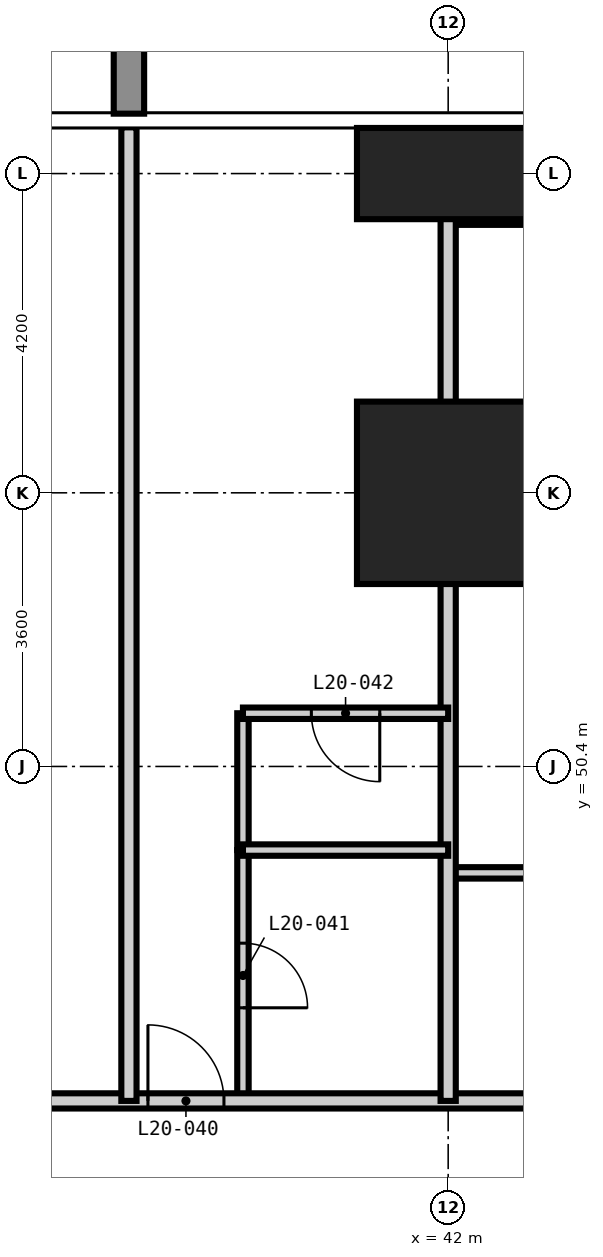
"""IFC4 building model, lengths in metres.
Left out: names, types, materials, properties, quantities, classifications, styles, units other than length and angle.
Written with IfcOpenShell. Run it as: python <this file> out.ifc"""

import sys

from ifc_helpers import new_model, si_unit, direction, frame, frame_2d, origin, origin_2d, place, context, subcontext, project, spatial, rectangle, extrude, element, fill, save


model = new_model("IFC4")
c1 = context("Model", 3, precision=1e-05, world=origin(), true_north=direction((0.0, 1.0)))
c2 = subcontext(c1, "Body", "Model", "MODEL_VIEW")
j1 = project(units=[si_unit("LENGTHUNIT", "METRE"), si_unit("PLANEANGLEUNIT", "RADIAN")], contexts=[c1])
p1 = place(None, origin())
s1 = spatial("IfcSite", under=j1, at=p1, CompositionType="ELEMENT")
p2 = place(p1, origin())
s2 = spatial("IfcBuilding", under=s1, at=p2, CompositionType="ELEMENT")
p3 = place(p2, frame((0.0, 0.0, 81.0)))
s3 = spatial("IfcBuildingStorey", under=s2, at=p3, CompositionType="ELEMENT", Elevation=81.0)
p4 = place(p3, frame((42.0, 54.0, -0.35), z_axis=(0.0, 0.0, 1.0), x_axis=(1.0, 0.0, 0.0)))
e1 = element("IfcColumn", 1, at=p4, inside=s3, PredefinedType="COLUMN", context=c2, shape_type="SweptSolid", body=[
    extrude(rectangle(XDim=2.4, YDim=2.4, at=origin_2d()), origin(), (0.0, 0.0, 1.0), 3.6),
])
p5 = place(p3, frame((42.0, 58.2, -0.35), z_axis=(0.0, 0.0, 1.0), x_axis=(1.0, 0.0, 0.0)))
e2 = element("IfcColumn", 2, at=p5, inside=s3, PredefinedType="COLUMN", context=c2, shape_type="SweptSolid", body=[
    extrude(rectangle(XDim=2.4, YDim=1.2, at=origin_2d()), origin(), (0.0, 0.0, 1.0), 3.6),
])
p6 = place(p3, frame((39.3, 46.0, 0.0), z_axis=(0.0, 0.0, 1.0), x_axis=(0.0, 1.0, 0.0)))
e3 = element("IfcWall", 3, at=p6, inside=s3, PredefinedType="PARTITIONING", context=c2, shape_type="SweptSolid", body=[
    extrude(rectangle(XDim=3.3, YDim=0.15, at=frame_2d((1.65, 0.0))), origin(), (0.0, 0.0, 1.0), 3.25),
])
p7 = place(p6, frame((1.225, 0.0, 0.0)))
e4 = element("IfcOpeningElement", 4, at=p7, cuts=e3, PredefinedType="OPENING", context=c2, shape_type="SweptSolid", body=[
    extrude(rectangle(XDim=0.85, YDim=2.1, at=frame_2d((0.425, 1.05))), frame((0.0, 0.085, 0.0), z_axis=(0.0, -1.0, 0.0), x_axis=(1.0, 0.0, 0.0)), (0.0, 0.0, 1.0), 0.17),
])
p8 = place(p3, frame((42.0, 49.0, 0.0), z_axis=(0.0, 0.0, 1.0), x_axis=(1.0, 0.0, 0.0)))
e5 = element("IfcWall", 5, at=p8, inside=s3, PredefinedType="PARTITIONING", context=c2, shape_type="SweptSolid", body=[
    extrude(rectangle(XDim=3.4, YDim=0.15, at=frame_2d((1.7, 0.0))), origin(), (0.0, 0.0, 1.0), 3.25),
])
p9 = place(p8, frame((1.275, 0.0, 0.0)))
e6 = element("IfcOpeningElement", 6, at=p9, cuts=e5, PredefinedType="OPENING", context=c2, shape_type="SweptSolid", body=[
    extrude(rectangle(XDim=0.85, YDim=2.1, at=frame_2d((0.425, 1.05))), frame((0.0, 0.085, 0.0), z_axis=(0.0, -1.0, 0.0), x_axis=(1.0, 0.0, 0.0)), (0.0, 0.0, 1.0), 0.17),
])
p10 = place(p3, frame((42.0, 57.6, 0.0), z_axis=(0.0, 0.0, 1.0), x_axis=(1.0, 0.0, 0.0)))
e7 = element("IfcWall", 7, at=p10, inside=s3, PredefinedType="PARTITIONING", context=c2, shape_type="SweptSolid", body=[
    extrude(rectangle(XDim=3.6, YDim=0.15, at=frame_2d((1.8, 0.0))), origin(), (0.0, 0.0, 1.0), 3.25),
])
p11 = place(p10, frame((1.375, 0.0, 0.0)))
e8 = element("IfcOpeningElement", 8, at=p11, cuts=e7, PredefinedType="OPENING", context=c2, shape_type="SweptSolid", body=[
    extrude(rectangle(XDim=0.85, YDim=2.1, at=frame_2d((0.425, 1.05))), frame((0.0, 0.085, 0.0), z_axis=(0.0, -1.0, 0.0), x_axis=(1.0, 0.0, 0.0)), (0.0, 0.0, 1.0), 0.17),
])
p12 = place(p3, frame((14.0, 46.0, 0.0), z_axis=(0.0, 0.0, 1.0), x_axis=(1.0, 0.0, 0.0)))
e9 = element("IfcWall", 9, at=p12, inside=s3, PredefinedType="PARTITIONING", context=c2, shape_type="SweptSolid", body=[
    extrude(rectangle(XDim=31.4, YDim=0.2, at=frame_2d((15.7, 0.0))), origin(), (0.0, 0.0, 1.0), 3.25),
])
p13 = place(p12, frame((5.75, 0.0, 0.0)))
e10 = element("IfcOpeningElement", 10, at=p13, cuts=e9, PredefinedType="OPENING", context=c2, shape_type="SweptSolid", body=[
    extrude(rectangle(XDim=1.0, YDim=2.2, at=frame_2d((0.5, 1.1))), frame((0.0, 0.11, 0.0), z_axis=(0.0, -1.0, 0.0), x_axis=(1.0, 0.0, 0.0)), (0.0, 0.0, 1.0), 0.22),
])
p14 = place(p12, frame((10.7, 0.0, 0.0)))
e11 = element("IfcOpeningElement", 11, at=p14, cuts=e9, PredefinedType="OPENING", context=c2, shape_type="SweptSolid", body=[
    extrude(rectangle(XDim=1.0, YDim=2.2, at=frame_2d((0.5, 1.1))), frame((0.0, 0.11, 0.0), z_axis=(0.0, -1.0, 0.0), x_axis=(1.0, 0.0, 0.0)), (0.0, 0.0, 1.0), 0.22),
])
p15 = place(p12, frame((19.1, 0.0, 0.0)))
e12 = element("IfcOpeningElement", 12, at=p15, cuts=e9, PredefinedType="OPENING", context=c2, shape_type="SweptSolid", body=[
    extrude(rectangle(XDim=1.0, YDim=2.2, at=frame_2d((0.5, 1.1))), frame((0.0, 0.11, 0.0), z_axis=(0.0, -1.0, 0.0), x_axis=(1.0, 0.0, 0.0)), (0.0, 0.0, 1.0), 0.22),
])
p16 = place(p12, frame((24.05, 0.0, 0.0)))
e13 = element("IfcOpeningElement", 13, at=p16, cuts=e9, PredefinedType="OPENING", context=c2, shape_type="SweptSolid", body=[
    extrude(rectangle(XDim=1.0, YDim=2.2, at=frame_2d((0.5, 1.1))), frame((0.0, 0.11, 0.0), z_axis=(0.0, -1.0, 0.0), x_axis=(1.0, 0.0, 0.0)), (0.0, 0.0, 1.0), 0.22),
])
for number, where, z_axis, x_axis in (
    (14, (37.8, 46.0, 0.0), (0.0, 0.0, 1.0), (0.0, 1.0, 0.0)),
    (15, (42.0, 46.0, 0.0), (0.0, 0.0, 1.0), (0.0, 1.0, 0.0)),
):
    element("IfcWall", number, at=place(p3, frame(where, z_axis=z_axis, x_axis=x_axis)), inside=s3, PredefinedType="PARTITIONING", context=c2, shape_type="SweptSolid", body=[
        extrude(rectangle(XDim=12.808, YDim=0.2, at=frame_2d((6.404, 0.0))), origin(), (0.0, 0.0, 1.0), 3.25),
    ])
p17 = place(p3, frame((39.3, 49.3, 0.0), z_axis=(0.0, 0.0, 1.0), x_axis=(0.0, 1.0, 0.0)))
e16 = element("IfcWall", 16, at=p17, inside=s3, PredefinedType="PARTITIONING", context=c2, shape_type="SweptSolid", body=[
    extrude(rectangle(XDim=1.8, YDim=0.15, at=frame_2d((0.9, 0.0))), origin(), (0.0, 0.0, 1.0), 3.25),
])
p18 = place(p3, frame((39.3, 49.3, 0.0), z_axis=(0.0, 0.0, 1.0), x_axis=(1.0, 0.0, 0.0)))
e17 = element("IfcWall", 17, at=p18, inside=s3, PredefinedType="PARTITIONING", context=c2, shape_type="SweptSolid", body=[
    extrude(rectangle(XDim=2.7, YDim=0.15, at=frame_2d((1.35, 0.0))), origin(), (0.0, 0.0, 1.0), 3.25),
])
p19 = place(p3, frame((39.3, 51.1, 0.0), z_axis=(0.0, 0.0, 1.0), x_axis=(1.0, 0.0, 0.0)))
e18 = element("IfcWall", 18, at=p19, inside=s3, PredefinedType="PARTITIONING", context=c2, shape_type="SweptSolid", body=[
    extrude(rectangle(XDim=2.7, YDim=0.15, at=frame_2d((1.35, 0.0))), origin(), (0.0, 0.0, 1.0), 3.25),
])
p20 = place(p19, frame((0.9, 0.0, 0.0)))
e19 = element("IfcOpeningElement", 19, at=p20, cuts=e18, PredefinedType="OPENING", context=c2, shape_type="SweptSolid", body=[
    extrude(rectangle(XDim=0.9, YDim=2.1, at=frame_2d((0.45, 1.05))), frame((0.0, 0.085, 0.0), z_axis=(0.0, -1.0, 0.0), x_axis=(1.0, 0.0, 0.0)), (0.0, 0.0, 1.0), 0.17),
])
p21 = place(p3, frame((42.0, 54.6, 0.0), z_axis=(0.0, 0.0, 1.0), x_axis=(1.0, 0.0, 0.0)))
e20 = element("IfcWall", 20, at=p21, inside=s3, PredefinedType="PARTITIONING", context=c2, shape_type="SweptSolid", body=[
    extrude(rectangle(XDim=16.808, YDim=0.15, at=frame_2d((8.404, 0.0))), origin(), (0.0, 0.0, 1.0), 3.25),
])
p22 = place(p21, frame((10.95, 0.0, 0.0)))
e21 = element("IfcOpeningElement", 21, at=p22, cuts=e20, PredefinedType="OPENING", context=c2, shape_type="SweptSolid", body=[
    extrude(rectangle(XDim=0.9, YDim=2.1, at=frame_2d((0.45, 1.05))), frame((0.0, 0.085, 0.0), z_axis=(0.0, -1.0, 0.0), x_axis=(1.0, 0.0, 0.0)), (0.0, 0.0, 1.0), 0.17),
])
p23 = place(p16, origin())
e22 = element("IfcDoor", 22, at=p23, inside=s3, OperationType="SINGLE_SWING_LEFT", PredefinedType="DOOR", context=c2, shape_type="SweptSolid", body=[
    extrude(rectangle(XDim=1.0, YDim=2.2, at=frame_2d((0.5, 1.1))), frame((0.0, 0.025, 0.0), z_axis=(0.0, -1.0, 0.0), x_axis=(1.0, 0.0, 0.0)), (0.0, 0.0, 1.0), 0.05),
])
fill(e13, e22)
p24 = place(p7, frame((0.85, 0.0, 0.0), z_axis=(0.0, 0.0, 1.0), x_axis=(-1.0, 0.0, 0.0)))
e23 = element("IfcDoor", 23, at=p24, inside=s3, OperationType="SINGLE_SWING_RIGHT", PredefinedType="DOOR", context=c2, shape_type="SweptSolid", body=[
    extrude(rectangle(XDim=0.85, YDim=2.1, at=frame_2d((0.425, 1.05))), frame((0.0, 0.025, 0.0), z_axis=(0.0, -1.0, 0.0), x_axis=(1.0, 0.0, 0.0)), (0.0, 0.0, 1.0), 0.05),
])
fill(e4, e23)
p25 = place(p20, frame((0.9, 0.0, 0.0), z_axis=(0.0, 0.0, 1.0), x_axis=(-1.0, 0.0, 0.0)))
e24 = element("IfcDoor", 24, at=p25, inside=s3, OperationType="SINGLE_SWING_LEFT", PredefinedType="DOOR", context=c2, shape_type="SweptSolid", body=[
    extrude(rectangle(XDim=0.9, YDim=2.1, at=frame_2d((0.45, 1.05))), frame((0.0, 0.025, 0.0), z_axis=(0.0, -1.0, 0.0), x_axis=(1.0, 0.0, 0.0)), (0.0, 0.0, 1.0), 0.05),
])
fill(e19, e24)
save(model, sys.argv[1])
